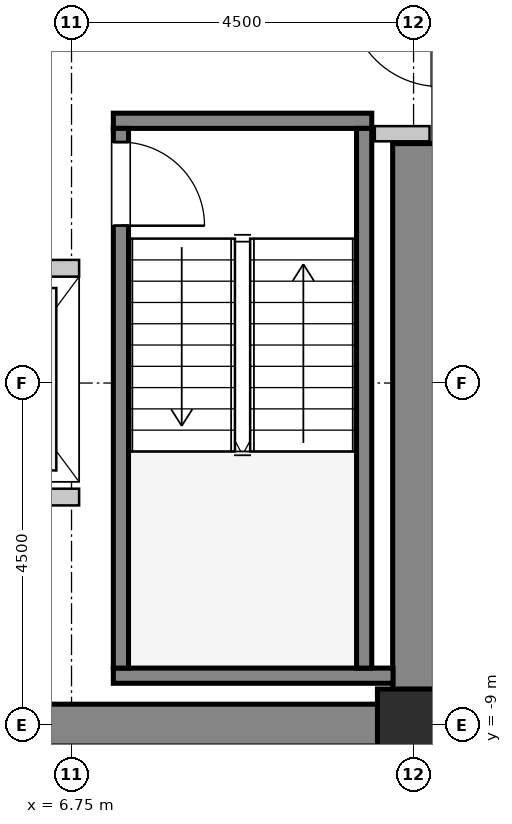
"""IFC4 building model, lengths in metres.
Left out: names, types, materials, properties, quantities, classifications, styles, units other than length and angle.
Written with IfcOpenShell. Run it as: python <this file> out.ifc"""

import sys

from ifc_helpers import new_model, si_unit, direction, frame, frame_2d, origin, origin_2d, place, context, subcontext, project, spatial, rectangle, hollow_rectangle, extrude, source, transform, mapped, element, fill, save


model = new_model("IFC4")
c1 = context("Model", 3, precision=1e-05, world=origin(), true_north=direction((0.0, 1.0)))
c2 = subcontext(c1, "Body", "Model", "MODEL_VIEW")
j1 = project(units=[si_unit("LENGTHUNIT", "METRE"), si_unit("PLANEANGLEUNIT", "RADIAN")], contexts=[c1])
p1 = place(None, origin())
s1 = spatial("IfcSite", under=j1, at=p1, CompositionType="ELEMENT")
p2 = place(p1, origin())
s2 = spatial("IfcBuilding", under=s1, at=p2, CompositionType="ELEMENT")
p3 = place(p2, frame((0.0, 0.0, 160.2)))
s3 = spatial("IfcBuildingStorey", under=s2, at=p3, CompositionType="ELEMENT", Elevation=160.2)
m1 = source(origin(), c2, "Body", "SweptSolid", [
    extrude(rectangle(XDim=9.975, YDim=0.55, at=frame_2d((4.987, 0.0))), origin(), (0.0, 0.0, 1.0), 3.8),
])
p4 = place(p3, frame((1.55, -9.0, 0.0), z_axis=(0.0, 0.0, 1.0), x_axis=(1.0, 0.0, 0.0)))
e1 = element("IfcWall", 1, at=p4, inside=s3, PredefinedType="SHEAR", context=c2, shape_type="MappedRepresentation", body=[
    mapped(m1, transform((0.0, 0.0, 0.0), x_axis=(1.0, 0.0, 0.0), y_axis=(0.0, 1.0, 0.0), z_axis=(0.0, 0.0, 1.0), scale=1.0)),
])
m2 = source(origin(), c2, "Body", "SweptSolid", [
    extrude(rectangle(XDim=7.375, YDim=0.55, at=frame_2d((3.688, 0.0))), origin(), (0.0, 0.0, 1.0), 3.8),
])
p5 = place(p3, frame((11.25, -8.725, 0.0), z_axis=(0.0, 0.0, 1.0), x_axis=(0.0, 1.0, 0.0)))
e2 = element("IfcWall", 2, at=p5, inside=s3, PredefinedType="SHEAR", context=c2, shape_type="MappedRepresentation", body=[
    mapped(m2, transform((0.0, 0.0, 0.0), x_axis=(1.0, 0.0, 0.0), y_axis=(0.0, 1.0, 0.0), z_axis=(0.0, 0.0, 1.0), scale=1.0)),
])
m3 = source(origin(), c2, "Body", "SweptSolid", [
    extrude(hollow_rectangle(XDim=0.95, YDim=0.95, WallThickness=0.045, InnerFilletRadius=0.045, OuterFilletRadius=0.09, at=origin_2d()), origin(), (0.0, 0.0, 1.0), 3.8),
])
p6 = place(p3, frame((11.25, -9.0, 0.0), z_axis=(0.0, 0.0, 1.0), x_axis=(1.0, 0.0, 0.0)))
e3 = element("IfcColumn", 3, at=p6, inside=s3, PredefinedType="COLUMN", context=c2, shape_type="MappedRepresentation", body=[
    mapped(m3, transform((0.0, 0.0, 0.0), x_axis=(1.0, 0.0, 0.0), y_axis=(0.0, 1.0, 0.0), z_axis=(0.0, 0.0, 1.0), scale=1.0)),
])
m4 = source(origin(), c2, "Body", "SweptSolid", [
    extrude(rectangle(XDim=3.4, YDim=0.2, at=frame_2d((1.7, 0.0))), origin(), (0.0, 0.0, 1.0), 3.8),
])
p7 = place(p3, frame((7.3, -1.05, 0.0), z_axis=(0.0, 0.0, 1.0), x_axis=(1.0, 0.0, 0.0)))
e4 = element("IfcWall", 4, at=p7, inside=s3, PredefinedType="SOLIDWALL", context=c2, shape_type="MappedRepresentation", body=[
    mapped(m4, transform((0.0, 0.0, 0.0), x_axis=(1.0, 0.0, 0.0), y_axis=(0.0, 1.0, 0.0), z_axis=(0.0, 0.0, 1.0), scale=1.0)),
])
m5 = source(origin(), c2, "Body", "SweptSolid", [
    extrude(rectangle(XDim=3.68, YDim=0.2, at=frame_2d((1.84, 0.0))), origin(), (0.0, 0.0, 1.0), 3.8),
])
p8 = place(p3, frame((7.3, -8.35, 0.0), z_axis=(0.0, 0.0, 1.0), x_axis=(1.0, 0.0, 0.0)))
e5 = element("IfcWall", 5, at=p8, inside=s3, PredefinedType="SOLIDWALL", context=c2, shape_type="MappedRepresentation", body=[
    mapped(m5, transform((0.0, 0.0, 0.0), x_axis=(1.0, 0.0, 0.0), y_axis=(0.0, 1.0, 0.0), z_axis=(0.0, 0.0, 1.0), scale=1.0)),
])
m6 = source(origin(), c2, "Body", "SweptSolid", [
    extrude(rectangle(XDim=7.1, YDim=0.2, at=frame_2d((3.55, 0.0))), origin(), (0.0, 0.0, 1.0), 3.8),
])
p9 = place(p3, frame((7.4, -1.15, 0.0), z_axis=(0.0, 0.0, 1.0), x_axis=(0.0, -1.0, 0.0)))
e6 = element("IfcWall", 6, at=p9, inside=s3, PredefinedType="SOLIDWALL", context=c2, shape_type="MappedRepresentation", body=[
    mapped(m6, transform((0.0, 0.0, 0.0), x_axis=(1.0, 0.0, 0.0), y_axis=(0.0, 1.0, 0.0), z_axis=(0.0, 0.0, 1.0), scale=1.0)),
])
p10 = place(p9, frame((0.18, 0.0, 0.0)))
e7 = element("IfcOpeningElement", 7, at=p10, cuts=e6, PredefinedType="OPENING", context=c2, shape_type="SweptSolid", body=[
    extrude(rectangle(XDim=1.1, YDim=2.15, at=frame_2d((0.55, 1.075))), frame((0.0, 0.11, 0.0), z_axis=(0.0, -1.0, 0.0), x_axis=(1.0, 0.0, 0.0)), (0.0, 0.0, 1.0), 0.22),
])
p11 = place(p3, frame((10.6, -1.15, 0.0), z_axis=(0.0, 0.0, 1.0), x_axis=(0.0, -1.0, 0.0)))
e8 = element("IfcWall", 8, at=p11, inside=s3, PredefinedType="SOLIDWALL", context=c2, shape_type="MappedRepresentation", body=[
    mapped(m6, transform((0.0, 0.0, 0.0), x_axis=(1.0, 0.0, 0.0), y_axis=(0.0, 1.0, 0.0), z_axis=(0.0, 0.0, 1.0), scale=1.0)),
])
m7 = source(origin(), c2, "Body", "SweptSolid", [
    extrude(rectangle(XDim=2.0, YDim=0.22, at=frame_2d((1.0, 0.0))), origin(), (0.0, 0.0, 1.0), 3.535),
])
p12 = place(p3, frame((6.85, -2.99, 0.0), z_axis=(0.0, 0.0, 1.0), x_axis=(-1.0, 0.0, 0.0)))
e9 = element("IfcWall", 9, at=p12, inside=s3, PredefinedType="SOLIDWALL", context=c2, shape_type="MappedRepresentation", body=[
    mapped(m7, transform((0.0, 0.0, 0.0), x_axis=(1.0, 0.0, 0.0), y_axis=(0.0, 1.0, 0.0), z_axis=(0.0, 0.0, 1.0), scale=1.0)),
])
p13 = place(p12, frame((0.4, 0.0, 0.0)))
e10 = element("IfcOpeningElement", 10, at=p13, cuts=e9, PredefinedType="OPENING", context=c2, shape_type="SweptSolid", body=[
    extrude(rectangle(XDim=1.2, YDim=2.2, at=frame_2d((0.6, 1.1))), frame((0.0, 0.12, 0.0), z_axis=(0.0, -1.0, 0.0), x_axis=(1.0, 0.0, 0.0)), (0.0, 0.0, 1.0), 0.24),
])
m8 = source(origin(), c2, "Body", "SweptSolid", [
    extrude(rectangle(XDim=2.095, YDim=0.22, at=frame_2d((1.048, 0.0))), origin(), (0.0, 0.0, 1.0), 3.535),
])
p14 = place(p3, frame((4.755, -6.0, 0.0), z_axis=(0.0, 0.0, 1.0), x_axis=(1.0, 0.0, 0.0)))
e11 = element("IfcWall", 11, at=p14, inside=s3, PredefinedType="SOLIDWALL", context=c2, shape_type="MappedRepresentation", body=[
    mapped(m8, transform((0.0, 0.0, 0.0), x_axis=(1.0, 0.0, 0.0), y_axis=(0.0, 1.0, 0.0), z_axis=(0.0, 0.0, 1.0), scale=1.0)),
])
m9 = source(origin(), c2, "Body", "SweptSolid", [
    extrude(rectangle(XDim=0.72, YDim=0.2, at=frame_2d((0.36, 0.0))), origin(), (0.0, 0.0, 1.0), 3.535),
])
p15 = place(p3, frame((10.74, -1.22, 0.0), z_axis=(0.0, 0.0, 1.0), x_axis=(1.0, 0.0, 0.0)))
e12 = element("IfcWall", 12, at=p15, inside=s3, PredefinedType="PARTITIONING", context=c2, shape_type="MappedRepresentation", body=[
    mapped(m9, transform((0.0, 0.0, 0.0), x_axis=(1.0, 0.0, 0.0), y_axis=(0.0, 1.0, 0.0), z_axis=(0.0, 0.0, 1.0), scale=1.0)),
])
m10 = source(origin(), c2, "Body", "SweptSolid", [
    extrude(rectangle(XDim=1.1, YDim=2.15, at=frame_2d((0.55, 1.075))), frame((0.0, 0.025, 0.0), z_axis=(0.0, -1.0, 0.0), x_axis=(1.0, 0.0, 0.0)), (0.0, 0.0, 1.0), 0.05),
])
p16 = place(p10, origin())
e13 = element("IfcDoor", 13, at=p16, inside=s3, OperationType="SINGLE_SWING_RIGHT", PredefinedType="DOOR", context=c2, shape_type="MappedRepresentation", body=[
    mapped(m10, transform((0.0, 0.0, 0.0), x_axis=(1.0, 0.0, 0.0), y_axis=(0.0, 1.0, 0.0), z_axis=(0.0, 0.0, 1.0), scale=1.0)),
])
fill(e7, e13)
save(model, sys.argv[1])
